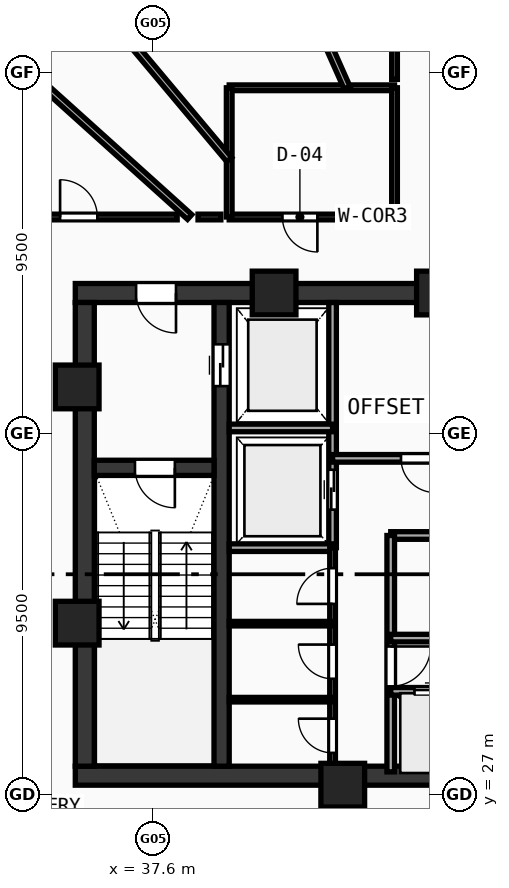
"""IFC4 building model, lengths in metres.
Left out: names, types, materials, properties, quantities, classifications, styles, units other than length and angle.
Written with IfcOpenShell. Run it as: python <this file> out.ifc"""

import sys

from ifc_helpers import new_model, si_unit, direction, frame, frame_2d, origin, origin_with_axes, origin_2d, place, context, subcontext, project, spatial, rectangle, hollow_rectangle, extrude, source, transform, mapped, element, fill, save


model = new_model("IFC4")
c1 = context("Model", 3, precision=1e-05, world=origin(), true_north=direction((0.0, 1.0)))
c2 = subcontext(c1, "Body", "Model", "MODEL_VIEW")
j1 = project(units=[si_unit("LENGTHUNIT", "METRE"), si_unit("PLANEANGLEUNIT", "RADIAN")], contexts=[c1])
p1 = place(None, origin())
s1 = spatial("IfcSite", under=j1, at=p1, CompositionType="ELEMENT")
p2 = place(p1, origin())
s2 = spatial("IfcBuilding", under=s1, at=p2, CompositionType="ELEMENT")
p3 = place(p2, frame((0.0, 0.0, 229.61)))
s3 = spatial("IfcBuildingStorey", under=s2, at=p3, CompositionType="ELEMENT", Elevation=229.61)
p4 = place(p3, frame((35.55, 27.5, 0.0), z_axis=(0.0, 0.0, 1.0), x_axis=(1.0, 0.0, 0.0)))
e1 = element("IfcWall", 1, at=p4, inside=s3, PredefinedType="SHEAR", context=c2, shape_type="SweptSolid", body=[
    extrude(rectangle(XDim=24.9, YDim=0.5, at=frame_2d((12.45, 0.0))), origin(), (0.0, 0.0, 1.0), 3.47),
])
p5 = place(p3, frame((35.55, 40.2, 0.0), z_axis=(0.0, 0.0, 1.0), x_axis=(1.0, 0.0, 0.0)))
e2 = element("IfcWall", 2, at=p5, inside=s3, PredefinedType="SHEAR", context=c2, shape_type="SweptSolid", body=[
    extrude(rectangle(XDim=11.25, YDim=0.5, at=frame_2d((5.625, 0.0))), origin(), (0.0, 0.0, 1.0), 3.47),
])
p6 = place(p5, frame((1.6, 0.0, 0.0)))
e3 = element("IfcOpeningElement", 3, at=p6, cuts=e2, PredefinedType="OPENING", context=c2, shape_type="SweptSolid", body=[
    extrude(rectangle(XDim=1.05, YDim=2.1, at=frame_2d((0.525, 1.05))), frame((0.0, 0.26, 0.0), z_axis=(0.0, -1.0, 0.0), x_axis=(1.0, 0.0, 0.0)), (0.0, 0.0, 1.0), 0.52),
])
p7 = place(p3, frame((35.8, 27.75, 0.0), z_axis=(0.0, 0.0, 1.0), x_axis=(0.0, 1.0, 0.0)))
e4 = element("IfcWall", 4, at=p7, inside=s3, PredefinedType="SHEAR", context=c2, shape_type="SweptSolid", body=[
    extrude(rectangle(XDim=12.2, YDim=0.5, at=frame_2d((6.1, 0.0))), origin(), (0.0, 0.0, 1.0), 3.47),
])
p8 = place(p3, frame((39.4, 27.75, 0.0), z_axis=(0.0, 0.0, 1.0), x_axis=(0.0, 1.0, 0.0)))
e5 = element("IfcWall", 5, at=p8, inside=s3, PredefinedType="SHEAR", context=c2, shape_type="SweptSolid", body=[
    extrude(rectangle(XDim=12.2, YDim=0.4, at=frame_2d((6.1, 0.0))), origin(), (0.0, 0.0, 1.0), 3.47),
])
p9 = place(p8, frame((10.0, 0.0, 0.0)))
e6 = element("IfcOpeningElement", 6, at=p9, cuts=e5, PredefinedType="OPENING", context=c2, shape_type="SweptSolid", body=[
    extrude(rectangle(XDim=1.1, YDim=2.1, at=frame_2d((0.55, 1.05))), frame((0.0, 0.21, 0.0), z_axis=(0.0, -1.0, 0.0), x_axis=(1.0, 0.0, 0.0)), (0.0, 0.0, 1.0), 0.42),
])
p10 = place(p3, frame((36.05, 35.6, 0.0), z_axis=(0.0, 0.0, 1.0), x_axis=(1.0, 0.0, 0.0)))
e7 = element("IfcWall", 7, at=p10, inside=s3, PredefinedType="SHEAR", context=c2, shape_type="SweptSolid", body=[
    extrude(rectangle(XDim=3.15, YDim=0.4, at=frame_2d((1.575, 0.0))), origin(), (0.0, 0.0, 1.0), 3.47),
])
p11 = place(p10, frame((1.07, 0.0, 0.0)))
e8 = element("IfcOpeningElement", 8, at=p11, cuts=e7, PredefinedType="OPENING", context=c2, shape_type="SweptSolid", body=[
    extrude(rectangle(XDim=1.05, YDim=2.1, at=frame_2d((0.525, 1.05))), frame((0.0, 0.21, 0.0), z_axis=(0.0, -1.0, 0.0), x_axis=(1.0, 0.0, 0.0)), (0.0, 0.0, 1.0), 0.42),
])
m1 = source(origin(), c2, "Body", "SweptSolid", [
    extrude(hollow_rectangle(XDim=1.15, YDim=1.15, WallThickness=0.048, at=origin_2d()), origin(), (0.0, 0.0, 1.0), 3.73),
])
for number, where, z_axis, x_axis in (
    (9, (42.588, 27.25, -0.26), (0.0, 0.0, 1.0), (1.0, 0.0, 0.0)),
    (10, (45.106, 40.2, -0.26), (0.0, 0.0, 1.0), (1.0, 0.0, 0.0)),
    (11, (40.781, 40.2, -0.26), (0.0, 0.0, 1.0), (1.0, 0.0, 0.0)),
    (12, (35.6, 37.729, -0.26), (0.0, 0.0, 1.0), (1.0, 0.0, 0.0)),
    (13, (35.6, 31.513, -0.26), (0.0, 0.0, 1.0), (1.0, 0.0, 0.0)),
):
    element("IfcColumn", number, at=place(p3, frame(where, z_axis=z_axis, x_axis=x_axis)), inside=s3, PredefinedType="COLUMN", context=c2, shape_type="MappedRepresentation", body=[
        mapped(m1, transform((0.0, 0.0, 0.0), scale=1.0)),
    ])
p12 = place(p3, frame((42.32, 33.5, 0.0), z_axis=(0.0, 0.0, 1.0), x_axis=(0.0, 1.0, 0.0)))
e14 = element("IfcWall", 14, at=p12, inside=s3, PredefinedType="SOLIDWALL", context=c2, shape_type="SweptSolid", body=[
    extrude(rectangle(XDim=6.45, YDim=0.2, at=frame_2d((3.225, 0.0))), origin(), (0.0, 0.0, 1.0), 3.47),
])
p13 = place(p12, frame((1.0, 0.0, 0.0)))
e15 = element("IfcOpeningElement", 15, at=p13, cuts=e14, PredefinedType="OPENING", context=c2, shape_type="SweptSolid", body=[
    extrude(rectangle(XDim=1.05, YDim=2.1, at=frame_2d((0.525, 1.05))), frame((0.0, 0.11, 0.0), z_axis=(0.0, -1.0, 0.0), x_axis=(1.0, 0.0, 0.0)), (0.0, 0.0, 1.0), 0.22),
])
for number, where, z_axis, x_axis in (
    (16, (39.6, 36.65, 0.0), (0.0, 0.0, 1.0), (1.0, 0.0, 0.0)),
    (17, (39.6, 33.5, 0.0), (0.0, 0.0, 1.0), (1.0, 0.0, 0.0)),
):
    element("IfcWall", number, at=place(p3, frame(where, z_axis=z_axis, x_axis=x_axis)), inside=s3, PredefinedType="SOLIDWALL", context=c2, shape_type="SweptSolid", body=[
        extrude(rectangle(XDim=2.72, YDim=0.2, at=frame_2d((1.36, 0.0))), origin(), (0.0, 0.0, 1.0), 3.47),
    ])
p14 = place(p3, frame((42.32, 35.85, 0.0), z_axis=(0.0, 0.0, 1.0), x_axis=(1.0, 0.0, 0.0)))
e18 = element("IfcWall", 18, at=p14, inside=s3, PredefinedType="SOLIDWALL", context=c2, shape_type="SweptSolid", body=[
    extrude(rectangle(XDim=4.73, YDim=0.2, at=frame_2d((2.365, 0.0))), origin(), (0.0, 0.0, 1.0), 3.47),
])
p15 = place(p14, frame((1.8, 0.0, 0.0)))
e19 = element("IfcOpeningElement", 19, at=p15, cuts=e18, PredefinedType="OPENING", context=c2, shape_type="SweptSolid", body=[
    extrude(rectangle(XDim=0.9, YDim=2.1, at=frame_2d((0.45, 1.05))), frame((0.0, 0.11, 0.0), z_axis=(0.0, -1.0, 0.0), x_axis=(1.0, 0.0, 0.0)), (0.0, 0.0, 1.0), 0.22),
])
p16 = place(p3, frame((43.85, 33.82, 0.0), z_axis=(0.0, 0.0, 1.0), x_axis=(1.0, 0.0, 0.0)))
e20 = element("IfcWall", 20, at=p16, inside=s3, PredefinedType="SOLIDWALL", context=c2, shape_type="SweptSolid", body=[
    extrude(rectangle(XDim=9.83, YDim=0.2, at=frame_2d((4.915, 0.0))), origin(), (0.0, 0.0, 1.0), 3.47),
])
p17 = place(p16, frame((1.2, 0.0, 0.0)))
e21 = element("IfcOpeningElement", 21, at=p17, cuts=e20, PredefinedType="OPENING", context=c2, shape_type="SweptSolid", body=[
    extrude(rectangle(XDim=0.9, YDim=2.1, at=frame_2d((0.45, 1.05))), frame((0.0, 0.11, 0.0), z_axis=(0.0, -1.0, 0.0), x_axis=(1.0, 0.0, 0.0)), (0.0, 0.0, 1.0), 0.22),
])
p18 = place(p16, frame((7.2, 0.0, 0.0)))
e22 = element("IfcOpeningElement", 22, at=p18, cuts=e20, PredefinedType="OPENING", context=c2, shape_type="SweptSolid", body=[
    extrude(rectangle(XDim=0.9, YDim=2.1, at=frame_2d((0.45, 1.05))), frame((0.0, 0.11, 0.0), z_axis=(0.0, -1.0, 0.0), x_axis=(1.0, 0.0, 0.0)), (0.0, 0.0, 1.0), 0.22),
])
p19 = place(p3, frame((43.85, 27.6, 0.0), z_axis=(0.0, 0.0, 1.0), x_axis=(0.0, 1.0, 0.0)))
e23 = element("IfcWall", 23, at=p19, inside=s3, PredefinedType="SOLIDWALL", context=c2, shape_type="SweptSolid", body=[
    extrude(rectangle(XDim=6.22, YDim=0.2, at=frame_2d((3.11, 0.0))), origin(), (0.0, 0.0, 1.0), 3.47),
])
p20 = place(p19, frame((2.25, 0.0, 0.0)))
e24 = element("IfcOpeningElement", 24, at=p20, cuts=e23, PredefinedType="OPENING", context=c2, shape_type="SweptSolid", body=[
    extrude(rectangle(XDim=1.05, YDim=2.1, at=frame_2d((0.525, 1.05))), frame((0.0, 0.11, 0.0), z_axis=(0.0, -1.0, 0.0), x_axis=(1.0, 0.0, 0.0)), (0.0, 0.0, 1.0), 0.22),
])
p21 = place(p3, frame((43.85, 29.72, 0.0), z_axis=(0.0, 0.0, 1.0), x_axis=(1.0, 0.0, 0.0)))
e25 = element("IfcWall", 25, at=p21, inside=s3, PredefinedType="SOLIDWALL", context=c2, shape_type="SweptSolid", body=[
    extrude(rectangle(XDim=7.2, YDim=0.2, at=frame_2d((3.6, 0.0))), origin(), (0.0, 0.0, 1.0), 3.47),
])
p22 = place(p21, frame((0.625, 0.0, 0.0)))
e26 = element("IfcOpeningElement", 26, at=p22, cuts=e25, PredefinedType="OPENING", context=c2, shape_type="SweptSolid", body=[
    extrude(rectangle(XDim=1.05, YDim=2.1, at=frame_2d((0.525, 1.05))), frame((0.0, 0.11, 0.0), z_axis=(0.0, -1.0, 0.0), x_axis=(1.0, 0.0, 0.0)), (0.0, 0.0, 1.0), 0.22),
])
p23 = place(p21, frame((3.075, 0.0, 0.0)))
e27 = element("IfcOpeningElement", 27, at=p23, cuts=e25, PredefinedType="OPENING", context=c2, shape_type="SweptSolid", body=[
    extrude(rectangle(XDim=1.05, YDim=2.1, at=frame_2d((0.525, 1.05))), frame((0.0, 0.11, 0.0), z_axis=(0.0, -1.0, 0.0), x_axis=(1.0, 0.0, 0.0)), (0.0, 0.0, 1.0), 0.22),
])
p24 = place(p21, frame((5.525, 0.0, 0.0)))
e28 = element("IfcOpeningElement", 28, at=p24, cuts=e25, PredefinedType="OPENING", context=c2, shape_type="SweptSolid", body=[
    extrude(rectangle(XDim=1.05, YDim=2.1, at=frame_2d((0.525, 1.05))), frame((0.0, 0.11, 0.0), z_axis=(0.0, -1.0, 0.0), x_axis=(1.0, 0.0, 0.0)), (0.0, 0.0, 1.0), 0.22),
])
p25 = place(p3, frame((43.85, 31.12, 0.0), z_axis=(0.0, 0.0, 1.0), x_axis=(1.0, 0.0, 0.0)))
e29 = element("IfcWall", 29, at=p25, inside=s3, PredefinedType="SOLIDWALL", context=c2, shape_type="SweptSolid", body=[
    extrude(rectangle(XDim=9.83, YDim=0.2, at=frame_2d((4.915, 0.0))), origin(), (0.0, 0.0, 1.0), 3.47),
])
p26 = place(p3, frame((42.32, 27.6, 0.0), z_axis=(0.0, 0.0, 1.0), x_axis=(0.0, 1.0, 0.0)))
e30 = element("IfcWall", 30, at=p26, inside=s3, PredefinedType="PARTITIONING", context=c2, shape_type="SweptSolid", body=[
    extrude(rectangle(XDim=5.9, YDim=0.15, at=frame_2d((2.95, 0.0))), origin(), (0.0, 0.0, 1.0), 3.47),
])
p27 = place(p26, frame((0.5, 0.0, 0.0)))
e31 = element("IfcOpeningElement", 31, at=p27, cuts=e30, PredefinedType="OPENING", context=c2, shape_type="SweptSolid", body=[
    extrude(rectangle(XDim=0.9, YDim=2.1, at=frame_2d((0.45, 1.05))), frame((0.0, 0.085, 0.0), z_axis=(0.0, -1.0, 0.0), x_axis=(1.0, 0.0, 0.0)), (0.0, 0.0, 1.0), 0.17),
])
p28 = place(p26, frame((2.45, 0.0, 0.0)))
e32 = element("IfcOpeningElement", 32, at=p28, cuts=e30, PredefinedType="OPENING", context=c2, shape_type="SweptSolid", body=[
    extrude(rectangle(XDim=0.9, YDim=2.1, at=frame_2d((0.45, 1.05))), frame((0.0, 0.085, 0.0), z_axis=(0.0, -1.0, 0.0), x_axis=(1.0, 0.0, 0.0)), (0.0, 0.0, 1.0), 0.17),
])
p29 = place(p26, frame((4.42, 0.0, 0.0)))
e33 = element("IfcOpeningElement", 33, at=p29, cuts=e30, PredefinedType="OPENING", context=c2, shape_type="SweptSolid", body=[
    extrude(rectangle(XDim=0.94, YDim=2.1, at=frame_2d((0.47, 1.05))), frame((0.0, 0.085, 0.0), z_axis=(0.0, -1.0, 0.0), x_axis=(1.0, 0.0, 0.0)), (0.0, 0.0, 1.0), 0.17),
])
for number, where, z_axis, x_axis in (
    (34, (39.6, 29.5, 0.0), (0.0, 0.0, 1.0), (1.0, 0.0, 0.0)),
    (35, (39.6, 31.5, 0.0), (0.0, 0.0, 1.0), (1.0, 0.0, 0.0)),
):
    element("IfcWall", number, at=place(p3, frame(where, z_axis=z_axis, x_axis=x_axis)), inside=s3, PredefinedType="PARTITIONING", context=c2, shape_type="SweptSolid", body=[
        extrude(rectangle(XDim=2.72, YDim=0.12, at=frame_2d((1.36, 0.0))), origin(), (0.0, 0.0, 1.0), 3.47),
    ])
p30 = place(p3, frame((39.6, 42.2, 0.0), z_axis=(0.0, 0.0, 1.0), x_axis=(1.0, 0.0, 0.0)))
e36 = element("IfcWall", 36, at=p30, inside=s3, PredefinedType="PARTITIONING", context=c2, shape_type="SweptSolid", body=[
    extrude(rectangle(XDim=4.35, YDim=0.15, at=frame_2d((2.175, 0.0))), origin(), (0.0, 0.0, 1.0), 3.47),
])
p31 = place(p30, frame((1.4, 0.0, 0.0)))
e37 = element("IfcOpeningElement", 37, at=p31, cuts=e36, PredefinedType="OPENING", context=c2, shape_type="SweptSolid", body=[
    extrude(rectangle(XDim=0.92, YDim=2.1, at=frame_2d((0.46, 1.05))), frame((0.0, 0.085, 0.0), z_axis=(0.0, -1.0, 0.0), x_axis=(1.0, 0.0, 0.0)), (0.0, 0.0, 1.0), 0.17),
])
p32 = place(p3, frame((39.6, 45.6, 0.0), z_axis=(0.0, 0.0, 1.0), x_axis=(1.0, 0.0, 0.0)))
e38 = element("IfcWall", 38, at=p32, inside=s3, PredefinedType="PARTITIONING", context=c2, shape_type="SweptSolid", body=[
    extrude(rectangle(XDim=4.35, YDim=0.15, at=frame_2d((2.175, 0.0))), origin(), (0.0, 0.0, 1.0), 2.82),
])
p33 = place(p3, frame((39.6, 42.2, 0.0), z_axis=(0.0, 0.0, 1.0), x_axis=(0.0, 1.0, 0.0)))
e39 = element("IfcWall", 39, at=p33, inside=s3, PredefinedType="PARTITIONING", context=c2, shape_type="SweptSolid", body=[
    extrude(rectangle(XDim=3.4, YDim=0.15, at=frame_2d((1.7, 0.0))), origin(), (0.0, 0.0, 1.0), 3.47),
])
p34 = place(p3, frame((43.95, 42.2, 0.0), z_axis=(0.0, 0.0, 1.0), x_axis=(0.0, 1.0, 0.0)))
e40 = element("IfcWall", 40, at=p34, inside=s3, PredefinedType="PARTITIONING", context=c2, shape_type="SweptSolid", body=[
    extrude(rectangle(XDim=3.4, YDim=0.15, at=frame_2d((1.7, 0.0))), origin(), (0.0, 0.0, 1.0), 2.82),
])
p35 = place(p3, frame((42.702, 45.6, 0.0), z_axis=(0.0, 0.0, 1.0), x_axis=(-0.406743256781, 0.913542513003, 0.0)))
e41 = element("IfcWall", 41, at=p35, inside=s3, PredefinedType="PARTITIONING", context=c2, shape_type="SweptSolid", body=[
    extrude(rectangle(XDim=23.368, YDim=0.17, at=frame_2d((11.684, 0.0))), origin(), (0.0, 0.0, 1.0), 2.82),
])
p36 = place(p3, frame((39.6, 43.711, 0.0), z_axis=(0.0, 0.0, 1.0), x_axis=(-0.642791950905, 0.766040800383, 0.0)))
e42 = element("IfcWall", 42, at=p36, inside=s3, PredefinedType="PARTITIONING", context=c2, shape_type="SweptSolid", body=[
    extrude(rectangle(XDim=18.806, YDim=0.17, at=frame_2d((9.403, 0.0))), origin(), (0.0, 0.0, 1.0), 2.82),
])
p37 = place(p3, frame((38.56, 42.2, 0.0), z_axis=(0.0, 0.0, 1.0), x_axis=(-0.743147575456, 0.669127552185, 0.0)))
e43 = element("IfcWall", 43, at=p37, inside=s3, PredefinedType="PARTITIONING", context=c2, shape_type="SweptSolid", body=[
    extrude(rectangle(XDim=18.141, YDim=0.17, at=frame_2d((9.07, 0.0))), origin(), (0.0, 0.0, 1.0), 2.82),
])
p38 = place(p3, frame((33.15, 42.2, 0.0), z_axis=(0.0, 0.0, 1.0), x_axis=(1.0, 0.0, 0.0)))
e44 = element("IfcWall", 44, at=p38, inside=s3, PredefinedType="PARTITIONING", context=c2, shape_type="SweptSolid", body=[
    extrude(rectangle(XDim=5.081, YDim=0.15, at=frame_2d((2.541, 0.0))), origin(), (0.0, 0.0, 1.0), 3.12),
])
p39 = place(p38, frame((2.0, 0.0, 0.0)))
e45 = element("IfcOpeningElement", 45, at=p39, cuts=e44, PredefinedType="OPENING", context=c2, shape_type="SweptSolid", body=[
    extrude(rectangle(XDim=0.98, YDim=2.12, at=frame_2d((0.49, 1.06))), frame((0.0, 0.085, 0.0), z_axis=(0.0, -1.0, 0.0), x_axis=(1.0, 0.0, 0.0)), (0.0, 0.0, 1.0), 0.17),
])
p40 = place(p3, frame((38.78, 42.2, 0.0), z_axis=(0.0, 0.0, 1.0), x_axis=(1.0, 0.0, 0.0)))
e46 = element("IfcWall", 46, at=p40, inside=s3, PredefinedType="PARTITIONING", context=c2, shape_type="SweptSolid", body=[
    extrude(rectangle(XDim=0.6, YDim=0.15, at=frame_2d((0.3, 0.0))), origin(), (0.0, 0.0, 1.0), 2.82),
])
p41 = place(p3, frame((43.95, 45.82, 0.0), z_axis=(0.0, 0.0, 1.0), x_axis=(0.0, 1.0, 0.0)))
e47 = element("IfcWall", 47, at=p41, inside=s3, PredefinedType="PARTITIONING", context=c2, shape_type="SweptSolid", body=[
    extrude(rectangle(XDim=9.96, YDim=0.15, at=frame_2d((4.98, 0.0))), origin(), (0.0, 0.0, 1.0), 3.12),
])
p42 = place(p41, frame((4.395, 0.0, 0.0)))
e48 = element("IfcOpeningElement", 48, at=p42, cuts=e47, PredefinedType="OPENING", context=c2, shape_type="SweptSolid", body=[
    extrude(rectangle(XDim=0.98, YDim=2.12, at=frame_2d((0.49, 1.06))), frame((0.0, 0.085, 0.0), z_axis=(0.0, -1.0, 0.0), x_axis=(1.0, 0.0, 0.0)), (0.0, 0.0, 1.0), 0.17),
])
m2 = source(origin(), c2, "Body", "SweptSolid", [
    extrude(rectangle(XDim=1.05, YDim=2.1, at=frame_2d((0.525, 1.05))), frame((0.0, 0.025, 0.0), z_axis=(0.0, -1.0, 0.0), x_axis=(1.0, 0.0, 0.0)), (0.0, 0.0, 1.0), 0.05),
])
p43 = place(p11, frame((1.05, 0.0, 0.0), z_axis=(0.0, 0.0, 1.0), x_axis=(-1.0, 0.0, 0.0)))
e49 = element("IfcDoor", 49, at=p43, inside=s3, OperationType="SINGLE_SWING_LEFT", PredefinedType="DOOR", context=c2, shape_type="MappedRepresentation", body=[
    mapped(m2, transform((0.0, 0.0, 0.0), scale=1.0)),
])
fill(e8, e49)
p44 = place(p6, frame((1.05, 0.0, 0.0), z_axis=(0.0, 0.0, 1.0), x_axis=(-1.0, 0.0, 0.0)))
e50 = element("IfcDoor", 50, at=p44, inside=s3, OperationType="SINGLE_SWING_LEFT", PredefinedType="DOOR", context=c2, shape_type="MappedRepresentation", body=[
    mapped(m2, transform((0.0, 0.0, 0.0), scale=1.0)),
])
fill(e3, e50)
m3 = source(origin(), c2, "Body", "SweptSolid", [
    extrude(rectangle(XDim=1.1, YDim=2.1, at=frame_2d((0.55, 1.05))), frame((0.0, 0.025, 0.0), z_axis=(0.0, -1.0, 0.0), x_axis=(1.0, 0.0, 0.0)), (0.0, 0.0, 1.0), 0.05),
])
p45 = place(p9, frame((1.1, 0.0, 0.0), z_axis=(0.0, 0.0, 1.0), x_axis=(-1.0, 0.0, 0.0)))
e51 = element("IfcDoor", 51, at=p45, inside=s3, OperationType="DOUBLE_DOOR_SLIDING", PredefinedType="DOOR", context=c2, shape_type="MappedRepresentation", body=[
    mapped(m3, transform((0.0, 0.0, 0.0), scale=1.0)),
])
fill(e6, e51)
p46 = place(p13, origin_with_axes())
e52 = element("IfcDoor", 52, at=p46, inside=s3, OperationType="DOUBLE_DOOR_SLIDING", PredefinedType="DOOR", context=c2, shape_type="MappedRepresentation", body=[
    mapped(m2, transform((0.0, 0.0, 0.0), scale=1.0)),
])
fill(e15, e52)
m4 = source(origin(), c2, "Body", "SweptSolid", [
    extrude(rectangle(XDim=0.9, YDim=2.1, at=frame_2d((0.45, 1.05))), frame((0.0, 0.025, 0.0), z_axis=(0.0, -1.0, 0.0), x_axis=(1.0, 0.0, 0.0)), (0.0, 0.0, 1.0), 0.05),
])
p47 = place(p15, frame((0.9, 0.0, 0.0), z_axis=(0.0, 0.0, 1.0), x_axis=(-1.0, 0.0, 0.0)))
e53 = element("IfcDoor", 53, at=p47, inside=s3, OperationType="SINGLE_SWING_LEFT", PredefinedType="DOOR", context=c2, shape_type="MappedRepresentation", body=[
    mapped(m4, transform((0.0, 0.0, 0.0), scale=1.0)),
])
fill(e19, e53)
p48 = place(p20, frame((1.05, 0.0, 0.0), z_axis=(0.0, 0.0, 1.0), x_axis=(-1.0, 0.0, 0.0)))
e54 = element("IfcDoor", 54, at=p48, inside=s3, OperationType="SINGLE_SWING_LEFT", PredefinedType="DOOR", context=c2, shape_type="MappedRepresentation", body=[
    mapped(m2, transform((0.0, 0.0, 0.0), scale=1.0)),
])
fill(e24, e54)
p49 = place(p22, origin_with_axes())
e55 = element("IfcDoor", 55, at=p49, inside=s3, OperationType="DOUBLE_DOOR_SLIDING", PredefinedType="DOOR", context=c2, shape_type="MappedRepresentation", body=[
    mapped(m2, transform((0.0, 0.0, 0.0), scale=1.0)),
])
fill(e26, e55)
p50 = place(p27, origin_with_axes())
e56 = element("IfcDoor", 56, at=p50, inside=s3, OperationType="SINGLE_SWING_RIGHT", PredefinedType="DOOR", context=c2, shape_type="MappedRepresentation", body=[
    mapped(m4, transform((0.0, 0.0, 0.0), scale=1.0)),
])
fill(e31, e56)
p51 = place(p28, origin_with_axes())
e57 = element("IfcDoor", 57, at=p51, inside=s3, OperationType="SINGLE_SWING_RIGHT", PredefinedType="DOOR", context=c2, shape_type="MappedRepresentation", body=[
    mapped(m4, transform((0.0, 0.0, 0.0), scale=1.0)),
])
fill(e32, e57)
m5 = source(origin(), c2, "Body", "SweptSolid", [
    extrude(rectangle(XDim=0.94, YDim=2.1, at=frame_2d((0.47, 1.05))), frame((0.0, 0.025, 0.0), z_axis=(0.0, -1.0, 0.0), x_axis=(1.0, 0.0, 0.0)), (0.0, 0.0, 1.0), 0.05),
])
p52 = place(p29, origin_with_axes())
e58 = element("IfcDoor", 58, at=p52, inside=s3, OperationType="SINGLE_SWING_LEFT", PredefinedType="DOOR", context=c2, shape_type="MappedRepresentation", body=[
    mapped(m5, transform((0.0, 0.0, 0.0), scale=1.0)),
])
fill(e33, e58)
m6 = source(origin(), c2, "Body", "SweptSolid", [
    extrude(rectangle(XDim=0.92, YDim=2.1, at=frame_2d((0.46, 1.05))), frame((0.0, 0.025, 0.0), z_axis=(0.0, -1.0, 0.0), x_axis=(1.0, 0.0, 0.0)), (0.0, 0.0, 1.0), 0.05),
])
p53 = place(p31, frame((0.92, 0.0, 0.0), z_axis=(0.0, 0.0, 1.0), x_axis=(-1.0, 0.0, 0.0)))
e59 = element("IfcDoor", 59, at=p53, inside=s3, OperationType="SINGLE_SWING_LEFT", PredefinedType="DOOR", context=c2, shape_type="MappedRepresentation", body=[
    mapped(m6, transform((0.0, 0.0, 0.0), scale=1.0)),
])
fill(e37, e59)
m7 = source(origin(), c2, "Body", "SweptSolid", [
    extrude(rectangle(XDim=0.98, YDim=2.12, at=frame_2d((0.49, 1.06))), frame((0.0, 0.025, 0.0), z_axis=(0.0, -1.0, 0.0), x_axis=(1.0, 0.0, 0.0)), (0.0, 0.0, 1.0), 0.05),
])
p54 = place(p39, origin_with_axes())
e60 = element("IfcDoor", 60, at=p54, inside=s3, OperationType="SINGLE_SWING_LEFT", PredefinedType="DOOR", context=c2, shape_type="MappedRepresentation", body=[
    mapped(m7, transform((0.0, 0.0, 0.0), scale=1.0)),
])
fill(e45, e60)
save(model, sys.argv[1])
